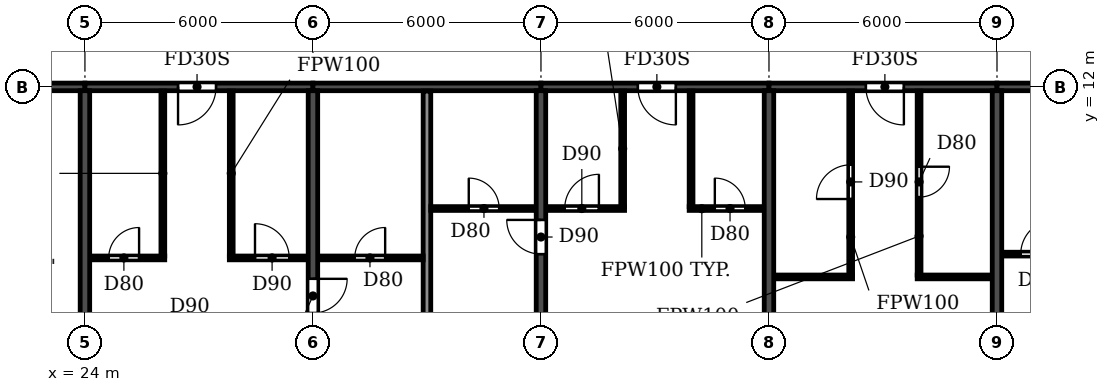
"""IFC4 building model, lengths in metres.
Left out: names, types, materials, properties, quantities, classifications, styles, units other than length and angle.
Written with IfcOpenShell. Run it as: python <this file> out.ifc"""

import sys

from ifc_helpers import new_model, si_unit, direction, frame, frame_2d, origin, place, context, subcontext, project, spatial, rectangle, extrude, element, fill, save


model = new_model("IFC4")
c1 = context("Model", 3, precision=1e-05, world=origin(), true_north=direction((0.0, 1.0)))
c2 = subcontext(c1, "Body", "Model", "MODEL_VIEW")
j1 = project(units=[si_unit("LENGTHUNIT", "METRE"), si_unit("PLANEANGLEUNIT", "RADIAN")], contexts=[c1])
p1 = place(None, origin())
s1 = spatial("IfcSite", under=j1, at=p1, CompositionType="ELEMENT")
p2 = place(p1, origin())
s2 = spatial("IfcBuilding", under=s1, at=p2, CompositionType="ELEMENT")
p3 = place(p2, frame((0.0, 0.0, 251.1)))
s3 = spatial("IfcBuildingStorey", under=s2, at=p3, CompositionType="ELEMENT", Elevation=251.1)
p4 = place(p3, frame((24.0, 0.2, 0.0), z_axis=(0.0, 0.0, 1.0), x_axis=(0.0, 1.0, 0.0)))
e1 = element("IfcWall", 1, at=p4, inside=s3, PredefinedType="SHEAR", context=c2, shape_type="SweptSolid", body=[
    extrude(rectangle(XDim=11.7, YDim=0.25, at=frame_2d((5.85, 0.0))), origin(), (0.0, 0.0, 1.0), 3.08),
])
p5 = place(p3, frame((30.0, 0.2, 0.0), z_axis=(0.0, 0.0, 1.0), x_axis=(0.0, 1.0, 0.0)))
e2 = element("IfcWall", 2, at=p5, inside=s3, PredefinedType="SHEAR", context=c2, shape_type="SweptSolid", body=[
    extrude(rectangle(XDim=11.7, YDim=0.25, at=frame_2d((5.85, 0.0))), origin(), (0.0, 0.0, 1.0), 3.08),
])
p6 = place(p5, frame((5.85, 0.0, 0.0)))
e3 = element("IfcOpeningElement", 3, at=p6, cuts=e2, PredefinedType="OPENING", context=c2, shape_type="SweptSolid", body=[
    extrude(rectangle(XDim=0.9, YDim=2.1, at=frame_2d((0.45, 1.05))), frame((0.0, 0.135, 0.0), z_axis=(0.0, -1.0, 0.0), x_axis=(1.0, 0.0, 0.0)), (0.0, 0.0, 1.0), 0.27),
])
p7 = place(p3, frame((36.0, 0.2, 0.0), z_axis=(0.0, 0.0, 1.0), x_axis=(0.0, 1.0, 0.0)))
e4 = element("IfcWall", 4, at=p7, inside=s3, PredefinedType="SHEAR", context=c2, shape_type="SweptSolid", body=[
    extrude(rectangle(XDim=11.7, YDim=0.25, at=frame_2d((5.85, 0.0))), origin(), (0.0, 0.0, 1.0), 3.08),
])
p8 = place(p7, frame((7.4, 0.0, 0.0)))
e5 = element("IfcOpeningElement", 5, at=p8, cuts=e4, PredefinedType="OPENING", context=c2, shape_type="SweptSolid", body=[
    extrude(rectangle(XDim=0.9, YDim=2.1, at=frame_2d((0.45, 1.05))), frame((0.0, 0.135, 0.0), z_axis=(0.0, -1.0, 0.0), x_axis=(1.0, 0.0, 0.0)), (0.0, 0.0, 1.0), 0.27),
])
for number, where, z_axis, x_axis in (
    (6, (42.0, 0.2, 0.0), (0.0, 0.0, 1.0), (0.0, 1.0, 0.0)),
    (7, (48.0, 0.2, 0.0), (0.0, 0.0, 1.0), (0.0, 1.0, 0.0)),
):
    element("IfcWall", number, at=place(p3, frame(where, z_axis=z_axis, x_axis=x_axis)), inside=s3, PredefinedType="SHEAR", context=c2, shape_type="SweptSolid", body=[
        extrude(rectangle(XDim=11.7, YDim=0.25, at=frame_2d((5.85, 0.0))), origin(), (0.0, 0.0, 1.0), 3.08),
    ])
p9 = place(p3, frame((18.2, 12.0, 0.0), z_axis=(0.0, 0.0, 1.0), x_axis=(1.0, 0.0, 0.0)))
e8 = element("IfcWall", 8, at=p9, inside=s3, PredefinedType="SHEAR", context=c2, shape_type="SweptSolid", body=[
    extrude(rectangle(XDim=5.8, YDim=0.2, at=frame_2d((2.9, 0.0))), origin(), (0.0, 0.0, 1.0), 2.48),
])
p10 = place(p9, frame((2.3, 0.0, 0.0)))
e9 = element("IfcOpeningElement", 9, at=p10, cuts=e8, PredefinedType="OPENING", context=c2, shape_type="SweptSolid", body=[
    extrude(rectangle(XDim=1.0, YDim=2.1, at=frame_2d((0.5, 1.05))), frame((0.0, 0.11, 0.0), z_axis=(0.0, -1.0, 0.0), x_axis=(1.0, 0.0, 0.0)), (0.0, 0.0, 1.0), 0.22),
])
p11 = place(p3, frame((24.0, 12.0, 0.0), z_axis=(0.0, 0.0, 1.0), x_axis=(1.0, 0.0, 0.0)))
e10 = element("IfcWall", 10, at=p11, inside=s3, PredefinedType="SHEAR", context=c2, shape_type="SweptSolid", body=[
    extrude(rectangle(XDim=6.0, YDim=0.2, at=frame_2d((3.0, 0.0))), origin(), (0.0, 0.0, 1.0), 2.48),
])
p12 = place(p11, frame((2.45, 0.0, 0.0)))
e11 = element("IfcOpeningElement", 11, at=p12, cuts=e10, PredefinedType="OPENING", context=c2, shape_type="SweptSolid", body=[
    extrude(rectangle(XDim=1.0, YDim=2.1, at=frame_2d((0.5, 1.05))), frame((0.0, 0.11, 0.0), z_axis=(0.0, -1.0, 0.0), x_axis=(1.0, 0.0, 0.0)), (0.0, 0.0, 1.0), 0.22),
])
p13 = place(p3, frame((30.0, 12.0, 0.0), z_axis=(0.0, 0.0, 1.0), x_axis=(1.0, 0.0, 0.0)))
e12 = element("IfcWall", 12, at=p13, inside=s3, PredefinedType="SHEAR", context=c2, shape_type="SweptSolid", body=[
    extrude(rectangle(XDim=6.0, YDim=0.2, at=frame_2d((3.0, 0.0))), origin(), (0.0, 0.0, 1.0), 2.48),
])
p14 = place(p3, frame((36.0, 12.0, 0.0), z_axis=(0.0, 0.0, 1.0), x_axis=(1.0, 0.0, 0.0)))
e13 = element("IfcWall", 13, at=p14, inside=s3, PredefinedType="SHEAR", context=c2, shape_type="SweptSolid", body=[
    extrude(rectangle(XDim=6.0, YDim=0.2, at=frame_2d((3.0, 0.0))), origin(), (0.0, 0.0, 1.0), 2.48),
])
p15 = place(p14, frame((2.55, 0.0, 0.0)))
e14 = element("IfcOpeningElement", 14, at=p15, cuts=e13, PredefinedType="OPENING", context=c2, shape_type="SweptSolid", body=[
    extrude(rectangle(XDim=1.0, YDim=2.1, at=frame_2d((0.5, 1.05))), frame((0.0, 0.11, 0.0), z_axis=(0.0, -1.0, 0.0), x_axis=(1.0, 0.0, 0.0)), (0.0, 0.0, 1.0), 0.22),
])
p16 = place(p3, frame((42.0, 12.0, 0.0), z_axis=(0.0, 0.0, 1.0), x_axis=(1.0, 0.0, 0.0)))
e15 = element("IfcWall", 15, at=p16, inside=s3, PredefinedType="SHEAR", context=c2, shape_type="SweptSolid", body=[
    extrude(rectangle(XDim=6.0, YDim=0.2, at=frame_2d((3.0, 0.0))), origin(), (0.0, 0.0, 1.0), 2.48),
])
p17 = place(p16, frame((2.55, 0.0, 0.0)))
e16 = element("IfcOpeningElement", 16, at=p17, cuts=e15, PredefinedType="OPENING", context=c2, shape_type="SweptSolid", body=[
    extrude(rectangle(XDim=1.0, YDim=2.1, at=frame_2d((0.5, 1.05))), frame((0.0, 0.11, 0.0), z_axis=(0.0, -1.0, 0.0), x_axis=(1.0, 0.0, 0.0)), (0.0, 0.0, 1.0), 0.22),
])
p18 = place(p3, frame((48.0, 12.0, 0.0), z_axis=(0.0, 0.0, 1.0), x_axis=(1.0, 0.0, 0.0)))
e17 = element("IfcWall", 17, at=p18, inside=s3, PredefinedType="SHEAR", context=c2, shape_type="SweptSolid", body=[
    extrude(rectangle(XDim=6.0, YDim=0.2, at=frame_2d((3.0, 0.0))), origin(), (0.0, 0.0, 1.0), 2.48),
])
p19 = place(p18, frame((2.55, 0.0, 0.0)))
e18 = element("IfcOpeningElement", 18, at=p19, cuts=e17, PredefinedType="OPENING", context=c2, shape_type="SweptSolid", body=[
    extrude(rectangle(XDim=1.0, YDim=2.1, at=frame_2d((0.5, 1.05))), frame((0.0, 0.11, 0.0), z_axis=(0.0, -1.0, 0.0), x_axis=(1.0, 0.0, 0.0)), (0.0, 0.0, 1.0), 0.22),
])
p20 = place(p3, frame((33.0, 0.06, 0.0), z_axis=(0.0, 0.0, 1.0), x_axis=(0.0, 1.0, 0.0)))
e19 = element("IfcWall", 19, at=p20, inside=s3, PredefinedType="PARTITIONING", context=c2, shape_type="SweptSolid", body=[
    extrude(rectangle(XDim=11.83, YDim=0.2, at=frame_2d((5.915, 0.0))), origin(), (0.0, 0.0, 1.0), 3.08),
])
p21 = place(p3, frame((42.135, 7.0, 0.0), z_axis=(0.0, 0.0, 1.0), x_axis=(1.0, 0.0, 0.0)))
e20 = element("IfcWall", 20, at=p21, inside=s3, PredefinedType="PARTITIONING", context=c2, shape_type="SweptSolid", body=[
    extrude(rectangle(XDim=2.065, YDim=0.1, at=frame_2d((1.032, 0.0))), origin(), (0.0, 0.0, 1.0), 3.08),
])
p22 = place(p3, frame((45.9, 7.0, 0.0), z_axis=(0.0, 0.0, 1.0), x_axis=(1.0, 0.0, 0.0)))
e21 = element("IfcWall", 21, at=p22, inside=s3, PredefinedType="PARTITIONING", context=c2, shape_type="SweptSolid", body=[
    extrude(rectangle(XDim=1.965, YDim=0.1, at=frame_2d((0.982, 0.0))), origin(), (0.0, 0.0, 1.0), 3.08),
])
p23 = place(p3, frame((24.135, 7.5, 0.0), z_axis=(0.0, 0.0, 1.0), x_axis=(1.0, 0.0, 0.0)))
e22 = element("IfcWall", 22, at=p23, inside=s3, PredefinedType="PARTITIONING", context=c2, shape_type="SweptSolid", body=[
    extrude(rectangle(XDim=1.965, YDim=0.1, at=frame_2d((0.982, 0.0))), origin(), (0.0, 0.0, 1.0), 3.08),
])
p24 = place(p23, frame((0.49, 0.0, 0.0)))
e23 = element("IfcOpeningElement", 23, at=p24, cuts=e22, PredefinedType="OPENING", context=c2, shape_type="SweptSolid", body=[
    extrude(rectangle(XDim=0.8, YDim=2.1, at=frame_2d((0.4, 1.05))), frame((0.0, 0.06, 0.0), z_axis=(0.0, -1.0, 0.0), x_axis=(1.0, 0.0, 0.0)), (0.0, 0.0, 1.0), 0.12),
])
p25 = place(p3, frame((27.8, 7.5, 0.0), z_axis=(0.0, 0.0, 1.0), x_axis=(1.0, 0.0, 0.0)))
e24 = element("IfcWall", 24, at=p25, inside=s3, PredefinedType="PARTITIONING", context=c2, shape_type="SweptSolid", body=[
    extrude(rectangle(XDim=2.065, YDim=0.1, at=frame_2d((1.032, 0.0))), origin(), (0.0, 0.0, 1.0), 3.08),
])
p26 = place(p25, frame((0.675, 0.0, 0.0)))
e25 = element("IfcOpeningElement", 25, at=p26, cuts=e24, PredefinedType="OPENING", context=c2, shape_type="SweptSolid", body=[
    extrude(rectangle(XDim=0.9, YDim=2.1, at=frame_2d((0.45, 1.05))), frame((0.0, 0.06, 0.0), z_axis=(0.0, -1.0, 0.0), x_axis=(1.0, 0.0, 0.0)), (0.0, 0.0, 1.0), 0.12),
])
p27 = place(p3, frame((30.135, 7.5, 0.0), z_axis=(0.0, 0.0, 1.0), x_axis=(1.0, 0.0, 0.0)))
e26 = element("IfcWall", 26, at=p27, inside=s3, PredefinedType="PARTITIONING", context=c2, shape_type="SweptSolid", body=[
    extrude(rectangle(XDim=2.765, YDim=0.1, at=frame_2d((1.382, 0.0))), origin(), (0.0, 0.0, 1.0), 3.08),
])
p28 = place(p27, frame((0.965, 0.0, 0.0)))
e27 = element("IfcOpeningElement", 27, at=p28, cuts=e26, PredefinedType="OPENING", context=c2, shape_type="SweptSolid", body=[
    extrude(rectangle(XDim=0.8, YDim=2.1, at=frame_2d((0.4, 1.05))), frame((0.0, 0.06, 0.0), z_axis=(0.0, -1.0, 0.0), x_axis=(1.0, 0.0, 0.0)), (0.0, 0.0, 1.0), 0.12),
])
p29 = place(p3, frame((48.135, 7.6, 0.0), z_axis=(0.0, 0.0, 1.0), x_axis=(1.0, 0.0, 0.0)))
e28 = element("IfcWall", 28, at=p29, inside=s3, PredefinedType="PARTITIONING", context=c2, shape_type="SweptSolid", body=[
    extrude(rectangle(XDim=2.065, YDim=0.1, at=frame_2d((1.032, 0.0))), origin(), (0.0, 0.0, 1.0), 3.08),
])
p30 = place(p29, frame((0.49, 0.0, 0.0)))
e29 = element("IfcOpeningElement", 29, at=p30, cuts=e28, PredefinedType="OPENING", context=c2, shape_type="SweptSolid", body=[
    extrude(rectangle(XDim=0.9, YDim=2.1, at=frame_2d((0.45, 1.05))), frame((0.0, 0.06, 0.0), z_axis=(0.0, -1.0, 0.0), x_axis=(1.0, 0.0, 0.0)), (0.0, 0.0, 1.0), 0.12),
])
p31 = place(p3, frame((33.1, 8.8, 0.0), z_axis=(0.0, 0.0, 1.0), x_axis=(1.0, 0.0, 0.0)))
e30 = element("IfcWall", 30, at=p31, inside=s3, PredefinedType="PARTITIONING", context=c2, shape_type="SweptSolid", body=[
    extrude(rectangle(XDim=2.765, YDim=0.1, at=frame_2d((1.382, 0.0))), origin(), (0.0, 0.0, 1.0), 3.08),
])
p32 = place(p31, frame((1.0, 0.0, 0.0)))
e31 = element("IfcOpeningElement", 31, at=p32, cuts=e30, PredefinedType="OPENING", context=c2, shape_type="SweptSolid", body=[
    extrude(rectangle(XDim=0.8, YDim=2.1, at=frame_2d((0.4, 1.05))), frame((0.0, 0.06, 0.0), z_axis=(0.0, -1.0, 0.0), x_axis=(1.0, 0.0, 0.0)), (0.0, 0.0, 1.0), 0.12),
])
p33 = place(p3, frame((36.135, 8.8, 0.0), z_axis=(0.0, 0.0, 1.0), x_axis=(1.0, 0.0, 0.0)))
e32 = element("IfcWall", 32, at=p33, inside=s3, PredefinedType="PARTITIONING", context=c2, shape_type="SweptSolid", body=[
    extrude(rectangle(XDim=2.065, YDim=0.1, at=frame_2d((1.032, 0.0))), origin(), (0.0, 0.0, 1.0), 3.08),
])
p34 = place(p33, frame((0.49, 0.0, 0.0)))
e33 = element("IfcOpeningElement", 33, at=p34, cuts=e32, PredefinedType="OPENING", context=c2, shape_type="SweptSolid", body=[
    extrude(rectangle(XDim=0.9, YDim=2.1, at=frame_2d((0.45, 1.05))), frame((0.0, 0.06, 0.0), z_axis=(0.0, -1.0, 0.0), x_axis=(1.0, 0.0, 0.0)), (0.0, 0.0, 1.0), 0.12),
])
p35 = place(p3, frame((39.9, 8.8, 0.0), z_axis=(0.0, 0.0, 1.0), x_axis=(1.0, 0.0, 0.0)))
e34 = element("IfcWall", 34, at=p35, inside=s3, PredefinedType="PARTITIONING", context=c2, shape_type="SweptSolid", body=[
    extrude(rectangle(XDim=1.965, YDim=0.1, at=frame_2d((0.982, 0.0))), origin(), (0.0, 0.0, 1.0), 3.08),
])
p36 = place(p35, frame((0.675, 0.0, 0.0)))
e35 = element("IfcOpeningElement", 35, at=p36, cuts=e34, PredefinedType="OPENING", context=c2, shape_type="SweptSolid", body=[
    extrude(rectangle(XDim=0.8, YDim=2.1, at=frame_2d((0.4, 1.05))), frame((0.0, 0.06, 0.0), z_axis=(0.0, -1.0, 0.0), x_axis=(1.0, 0.0, 0.0)), (0.0, 0.0, 1.0), 0.12),
])
for number, where, z_axis, x_axis in (
    (36, (26.05, 7.55, 0.0), (0.0, 0.0, 1.0), (0.0, 1.0, 0.0)),
    (37, (27.85, 7.55, 0.0), (0.0, 0.0, 1.0), (0.0, 1.0, 0.0)),
):
    element("IfcWall", number, at=place(p3, frame(where, z_axis=z_axis, x_axis=x_axis)), inside=s3, PredefinedType="PARTITIONING", context=c2, shape_type="SweptSolid", body=[
        extrude(rectangle(XDim=4.34, YDim=0.1, at=frame_2d((2.17, 0.0))), origin(), (0.0, 0.0, 1.0), 3.08),
    ])
for number, where, z_axis, x_axis in (
    (38, (38.15, 8.85, 0.0), (0.0, 0.0, 1.0), (0.0, 1.0, 0.0)),
    (39, (39.95, 8.85, 0.0), (0.0, 0.0, 1.0), (0.0, 1.0, 0.0)),
):
    element("IfcWall", number, at=place(p3, frame(where, z_axis=z_axis, x_axis=x_axis)), inside=s3, PredefinedType="PARTITIONING", context=c2, shape_type="SweptSolid", body=[
        extrude(rectangle(XDim=3.04, YDim=0.1, at=frame_2d((1.52, 0.0))), origin(), (0.0, 0.0, 1.0), 3.08),
    ])
p37 = place(p3, frame((44.15, 7.05, 0.0), z_axis=(0.0, 0.0, 1.0), x_axis=(0.0, 1.0, 0.0)))
e40 = element("IfcWall", 40, at=p37, inside=s3, PredefinedType="PARTITIONING", context=c2, shape_type="SweptSolid", body=[
    extrude(rectangle(XDim=4.84, YDim=0.1, at=frame_2d((2.42, 0.0))), origin(), (0.0, 0.0, 1.0), 3.08),
])
p38 = place(p37, frame((2.0, 0.0, 0.0)))
e41 = element("IfcOpeningElement", 41, at=p38, cuts=e40, PredefinedType="OPENING", context=c2, shape_type="SweptSolid", body=[
    extrude(rectangle(XDim=0.9, YDim=2.1, at=frame_2d((0.45, 1.05))), frame((0.0, 0.06, 0.0), z_axis=(0.0, -1.0, 0.0), x_axis=(1.0, 0.0, 0.0)), (0.0, 0.0, 1.0), 0.12),
])
p39 = place(p3, frame((45.95, 7.05, 0.0), z_axis=(0.0, 0.0, 1.0), x_axis=(0.0, 1.0, 0.0)))
e42 = element("IfcWall", 42, at=p39, inside=s3, PredefinedType="PARTITIONING", context=c2, shape_type="SweptSolid", body=[
    extrude(rectangle(XDim=4.84, YDim=0.1, at=frame_2d((2.42, 0.0))), origin(), (0.0, 0.0, 1.0), 3.08),
])
p40 = place(p39, frame((2.05, 0.0, 0.0)))
e43 = element("IfcOpeningElement", 43, at=p40, cuts=e42, PredefinedType="OPENING", context=c2, shape_type="SweptSolid", body=[
    extrude(rectangle(XDim=0.8, YDim=2.1, at=frame_2d((0.4, 1.05))), frame((0.0, 0.06, 0.0), z_axis=(0.0, -1.0, 0.0), x_axis=(1.0, 0.0, 0.0)), (0.0, 0.0, 1.0), 0.12),
])
p41 = place(p28, origin())
e44 = element("IfcDoor", 44, at=p41, inside=s3, OperationType="SINGLE_SWING_RIGHT", PredefinedType="DOOR", context=c2, shape_type="SweptSolid", body=[
    extrude(rectangle(XDim=0.8, YDim=2.1, at=frame_2d((0.4, 1.05))), frame((0.0, 0.025, 0.0), z_axis=(0.0, -1.0, 0.0), x_axis=(1.0, 0.0, 0.0)), (0.0, 0.0, 1.0), 0.05),
])
fill(e27, e44)
p42 = place(p24, origin())
e45 = element("IfcDoor", 45, at=p42, inside=s3, OperationType="SINGLE_SWING_RIGHT", PredefinedType="DOOR", context=c2, shape_type="SweptSolid", body=[
    extrude(rectangle(XDim=0.8, YDim=2.1, at=frame_2d((0.4, 1.05))), frame((0.0, 0.025, 0.0), z_axis=(0.0, -1.0, 0.0), x_axis=(1.0, 0.0, 0.0)), (0.0, 0.0, 1.0), 0.05),
])
fill(e23, e45)
p43 = place(p12, frame((1.0, 0.0, 0.0), z_axis=(0.0, 0.0, 1.0), x_axis=(-1.0, 0.0, 0.0)))
e46 = element("IfcDoor", 46, at=p43, inside=s3, OperationType="SINGLE_SWING_RIGHT", PredefinedType="DOOR", context=c2, shape_type="SweptSolid", body=[
    extrude(rectangle(XDim=1.0, YDim=2.1, at=frame_2d((0.5, 1.05))), frame((0.0, 0.025, 0.0), z_axis=(0.0, -1.0, 0.0), x_axis=(1.0, 0.0, 0.0)), (0.0, 0.0, 1.0), 0.05),
])
fill(e11, e46)
p44 = place(p26, origin())
e47 = element("IfcDoor", 47, at=p44, inside=s3, OperationType="SINGLE_SWING_LEFT", PredefinedType="DOOR", context=c2, shape_type="SweptSolid", body=[
    extrude(rectangle(XDim=0.9, YDim=2.1, at=frame_2d((0.45, 1.05))), frame((0.0, 0.025, 0.0), z_axis=(0.0, -1.0, 0.0), x_axis=(1.0, 0.0, 0.0)), (0.0, 0.0, 1.0), 0.05),
])
fill(e25, e47)
p45 = place(p6, frame((0.9, 0.0, 0.0), z_axis=(0.0, 0.0, 1.0), x_axis=(-1.0, 0.0, 0.0)))
e48 = element("IfcDoor", 48, at=p45, inside=s3, OperationType="SINGLE_SWING_LEFT", PredefinedType="DOOR", context=c2, shape_type="SweptSolid", body=[
    extrude(rectangle(XDim=0.9, YDim=2.1, at=frame_2d((0.45, 1.05))), frame((0.0, 0.025, 0.0), z_axis=(0.0, -1.0, 0.0), x_axis=(1.0, 0.0, 0.0)), (0.0, 0.0, 1.0), 0.05),
])
fill(e3, e48)
p46 = place(p32, origin())
e49 = element("IfcDoor", 49, at=p46, inside=s3, OperationType="SINGLE_SWING_LEFT", PredefinedType="DOOR", context=c2, shape_type="SweptSolid", body=[
    extrude(rectangle(XDim=0.8, YDim=2.1, at=frame_2d((0.4, 1.05))), frame((0.0, 0.025, 0.0), z_axis=(0.0, -1.0, 0.0), x_axis=(1.0, 0.0, 0.0)), (0.0, 0.0, 1.0), 0.05),
])
fill(e31, e49)
p47 = place(p8, origin())
e50 = element("IfcDoor", 50, at=p47, inside=s3, OperationType="SINGLE_SWING_RIGHT", PredefinedType="DOOR", context=c2, shape_type="SweptSolid", body=[
    extrude(rectangle(XDim=0.9, YDim=2.1, at=frame_2d((0.45, 1.05))), frame((0.0, 0.025, 0.0), z_axis=(0.0, -1.0, 0.0), x_axis=(1.0, 0.0, 0.0)), (0.0, 0.0, 1.0), 0.05),
])
fill(e5, e50)
p48 = place(p34, origin())
e51 = element("IfcDoor", 51, at=p48, inside=s3, OperationType="SINGLE_SWING_RIGHT", PredefinedType="DOOR", context=c2, shape_type="SweptSolid", body=[
    extrude(rectangle(XDim=0.9, YDim=2.1, at=frame_2d((0.45, 1.05))), frame((0.0, 0.025, 0.0), z_axis=(0.0, -1.0, 0.0), x_axis=(1.0, 0.0, 0.0)), (0.0, 0.0, 1.0), 0.05),
])
fill(e33, e51)
p49 = place(p15, frame((1.0, 0.0, 0.0), z_axis=(0.0, 0.0, 1.0), x_axis=(-1.0, 0.0, 0.0)))
e52 = element("IfcDoor", 52, at=p49, inside=s3, OperationType="SINGLE_SWING_LEFT", PredefinedType="DOOR", context=c2, shape_type="SweptSolid", body=[
    extrude(rectangle(XDim=1.0, YDim=2.1, at=frame_2d((0.5, 1.05))), frame((0.0, 0.025, 0.0), z_axis=(0.0, -1.0, 0.0), x_axis=(1.0, 0.0, 0.0)), (0.0, 0.0, 1.0), 0.05),
])
fill(e14, e52)
p50 = place(p36, origin())
e53 = element("IfcDoor", 53, at=p50, inside=s3, OperationType="SINGLE_SWING_LEFT", PredefinedType="DOOR", context=c2, shape_type="SweptSolid", body=[
    extrude(rectangle(XDim=0.8, YDim=2.1, at=frame_2d((0.4, 1.05))), frame((0.0, 0.025, 0.0), z_axis=(0.0, -1.0, 0.0), x_axis=(1.0, 0.0, 0.0)), (0.0, 0.0, 1.0), 0.05),
])
fill(e35, e53)
p51 = place(p38, origin())
e54 = element("IfcDoor", 54, at=p51, inside=s3, OperationType="SINGLE_SWING_LEFT", PredefinedType="DOOR", context=c2, shape_type="SweptSolid", body=[
    extrude(rectangle(XDim=0.9, YDim=2.1, at=frame_2d((0.45, 1.05))), frame((0.0, 0.025, 0.0), z_axis=(0.0, -1.0, 0.0), x_axis=(1.0, 0.0, 0.0)), (0.0, 0.0, 1.0), 0.05),
])
fill(e41, e54)
p52 = place(p17, frame((1.0, 0.0, 0.0), z_axis=(0.0, 0.0, 1.0), x_axis=(-1.0, 0.0, 0.0)))
e55 = element("IfcDoor", 55, at=p52, inside=s3, OperationType="SINGLE_SWING_LEFT", PredefinedType="DOOR", context=c2, shape_type="SweptSolid", body=[
    extrude(rectangle(XDim=1.0, YDim=2.1, at=frame_2d((0.5, 1.05))), frame((0.0, 0.025, 0.0), z_axis=(0.0, -1.0, 0.0), x_axis=(1.0, 0.0, 0.0)), (0.0, 0.0, 1.0), 0.05),
])
fill(e16, e55)
p53 = place(p40, frame((0.8, 0.0, 0.0), z_axis=(0.0, 0.0, 1.0), x_axis=(-1.0, 0.0, 0.0)))
e56 = element("IfcDoor", 56, at=p53, inside=s3, OperationType="SINGLE_SWING_LEFT", PredefinedType="DOOR", context=c2, shape_type="SweptSolid", body=[
    extrude(rectangle(XDim=0.8, YDim=2.1, at=frame_2d((0.4, 1.05))), frame((0.0, 0.025, 0.0), z_axis=(0.0, -1.0, 0.0), x_axis=(1.0, 0.0, 0.0)), (0.0, 0.0, 1.0), 0.05),
])
fill(e43, e56)
p54 = place(p30, origin())
e57 = element("IfcDoor", 57, at=p54, inside=s3, OperationType="SINGLE_SWING_RIGHT", PredefinedType="DOOR", context=c2, shape_type="SweptSolid", body=[
    extrude(rectangle(XDim=0.9, YDim=2.1, at=frame_2d((0.45, 1.05))), frame((0.0, 0.025, 0.0), z_axis=(0.0, -1.0, 0.0), x_axis=(1.0, 0.0, 0.0)), (0.0, 0.0, 1.0), 0.05),
])
fill(e29, e57)
save(model, sys.argv[1])
